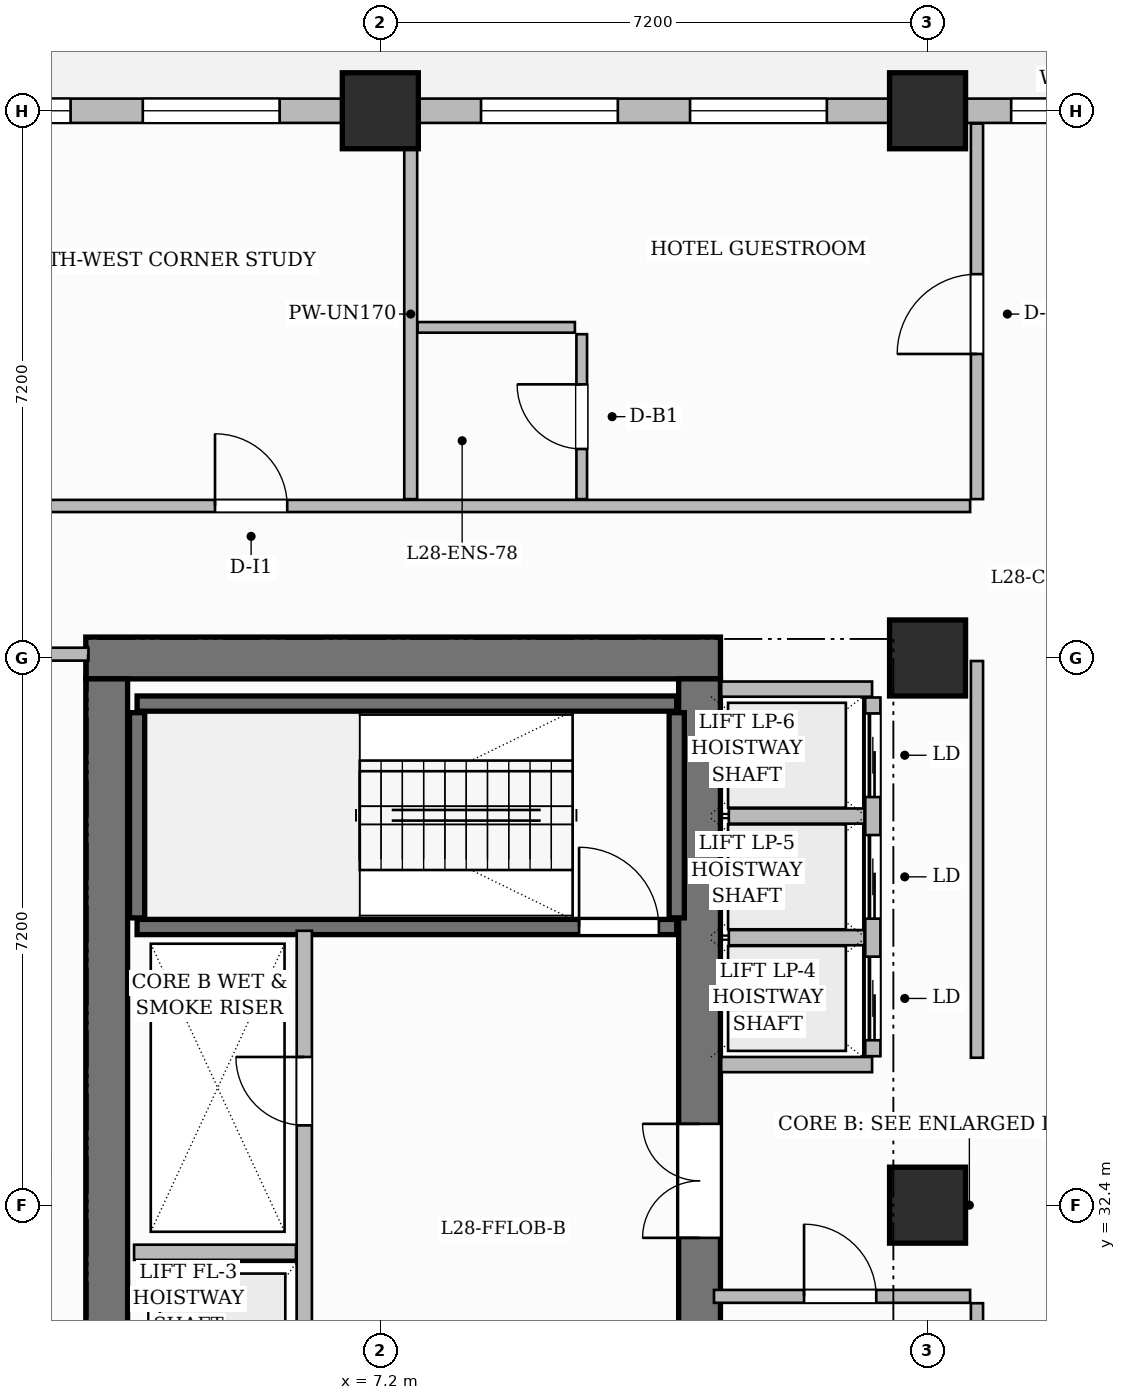
"""IFC4 building model, lengths in metres.
Left out: names, types, materials, properties, quantities, classifications, styles, units other than length and angle.
Written with IfcOpenShell. Run it as: python <this file> out.ifc"""

import sys

from ifc_helpers import new_model, si_unit, direction, frame, frame_2d, origin, origin_2d, place, context, subcontext, project, spatial, rectangle, extrude, source, transform, mapped, element, fill, save


model = new_model("IFC4")
c1 = context("Model", 3, precision=1e-05, world=origin(), true_north=direction((0.0, 1.0)))
c2 = subcontext(c1, "Body", "Model", "MODEL_VIEW")
j1 = project(units=[si_unit("LENGTHUNIT", "METRE"), si_unit("PLANEANGLEUNIT", "RADIAN")], contexts=[c1])
p1 = place(None, origin())
s1 = spatial("IfcSite", under=j1, at=p1, CompositionType="ELEMENT")
p2 = place(p1, origin())
s2 = spatial("IfcBuilding", under=s1, at=p2, CompositionType="ELEMENT")
p3 = place(p2, frame((0.0, 0.0, 115.5)))
s3 = spatial("IfcBuildingStorey", under=s2, at=p3, CompositionType="ELEMENT", Elevation=115.5)
p4 = place(p3, frame((3.325, 39.6, 0.0), z_axis=(0.0, 0.0, 1.0), x_axis=(1.0, 0.0, 0.0)))
e1 = element("IfcWall", 1, at=p4, inside=s3, PredefinedType="SHEAR", context=c2, shape_type="SweptSolid", body=[
    extrude(rectangle(XDim=8.35, YDim=0.55, at=frame_2d((4.175, 0.0))), origin(), (0.0, 0.0, 1.0), 3.7),
])
p5 = place(p3, frame((3.6, 25.475, 0.0), z_axis=(0.0, 0.0, 1.0), x_axis=(0.0, 1.0, 0.0)))
e2 = element("IfcWall", 2, at=p5, inside=s3, PredefinedType="SHEAR", context=c2, shape_type="SweptSolid", body=[
    extrude(rectangle(XDim=13.85, YDim=0.55, at=frame_2d((6.925, 0.0))), origin(), (0.0, 0.0, 1.0), 3.7),
])
p6 = place(p3, frame((11.4, 25.475, 0.0), z_axis=(0.0, 0.0, 1.0), x_axis=(0.0, 1.0, 0.0)))
e3 = element("IfcWall", 3, at=p6, inside=s3, PredefinedType="SHEAR", context=c2, shape_type="SweptSolid", body=[
    extrude(rectangle(XDim=13.85, YDim=0.55, at=frame_2d((6.925, 0.0))), origin(), (0.0, 0.0, 1.0), 3.7),
])
p7 = place(p6, frame((6.495, 0.0, 0.0)))
e4 = element("IfcOpeningElement", 4, at=p7, cuts=e3, PredefinedType="OPENING", context=c2, shape_type="SweptSolid", body=[
    extrude(rectangle(XDim=1.5, YDim=2.2, at=frame_2d((0.75, 1.1))), frame((0.0, 0.285, 0.0), z_axis=(0.0, -1.0, 0.0), x_axis=(1.0, 0.0, 0.0)), (0.0, 0.0, 1.0), 0.57),
])
m1 = source(origin(), c2, "Body", "SweptSolid", [
    extrude(rectangle(XDim=1.0, YDim=1.0, at=origin_2d()), origin(), (0.0, 0.0, 1.0), 3.7),
])
for number, where, z_axis, x_axis in (
    (5, (7.2, 46.8, 0.0), (0.0, 0.0, 1.0), (1.0, 0.0, 0.0)),
    (6, (14.4, 32.4, 0.0), (0.0, 0.0, 1.0), (1.0, 0.0, 0.0)),
    (7, (14.4, 39.6, 0.0), (0.0, 0.0, 1.0), (1.0, 0.0, 0.0)),
    (8, (14.4, 46.8, 0.0), (0.0, 0.0, 1.0), (1.0, 0.0, 0.0)),
):
    element("IfcColumn", number, at=place(p3, frame(where, z_axis=z_axis, x_axis=x_axis)), inside=s3, PredefinedType="COLUMN", context=c2, shape_type="MappedRepresentation", body=[
        mapped(m1, transform((0.0, 0.0, 0.0), scale=1.0)),
    ])
p8 = place(p3, frame((4.0, 39.0, 0.0), z_axis=(0.0, 0.0, 1.0), x_axis=(1.0, 0.0, 0.0)))
e9 = element("IfcWall", 9, at=p8, inside=s3, PredefinedType="SHEAR", context=c2, shape_type="SweptSolid", body=[
    extrude(rectangle(XDim=7.1, YDim=0.2, at=frame_2d((3.55, 0.0))), origin(), (0.0, 0.0, 1.0), 3.7),
])
for number, where, z_axis, x_axis in (
    (10, (4.0, 36.18, 0.0), (0.0, 0.0, 1.0), (0.0, 1.0, 0.0)),
    (11, (11.1, 36.18, 0.0), (0.0, 0.0, 1.0), (0.0, 1.0, 0.0)),
):
    element("IfcWall", number, at=place(p3, frame(where, z_axis=z_axis, x_axis=x_axis)), inside=s3, PredefinedType="SHEAR", context=c2, shape_type="SweptSolid", body=[
        extrude(rectangle(XDim=2.7, YDim=0.2, at=frame_2d((1.35, 0.0))), origin(), (0.0, 0.0, 1.0), 3.7),
    ])
p9 = place(p3, frame((4.0, 36.06, 0.0), z_axis=(0.0, 0.0, 1.0), x_axis=(1.0, 0.0, 0.0)))
e12 = element("IfcWall", 12, at=p9, inside=s3, PredefinedType="SHEAR", context=c2, shape_type="SweptSolid", body=[
    extrude(rectangle(XDim=7.1, YDim=0.2, at=frame_2d((3.55, 0.0))), origin(), (0.0, 0.0, 1.0), 3.7),
])
p10 = place(p9, frame((5.815, 0.0, 0.0)))
e13 = element("IfcOpeningElement", 13, at=p10, cuts=e12, PredefinedType="OPENING", context=c2, shape_type="SweptSolid", body=[
    extrude(rectangle(XDim=1.05, YDim=2.2, at=frame_2d((0.525, 1.1))), frame((0.0, 0.11, 0.0), z_axis=(0.0, -1.0, 0.0), x_axis=(1.0, 0.0, 0.0)), (0.0, 0.0, 1.0), 0.22),
])
p11 = place(p3, frame((6.2, 28.79, 0.0), z_axis=(0.0, 0.0, 1.0), x_axis=(0.0, 1.0, 0.0)))
e14 = element("IfcWall", 14, at=p11, inside=s3, PredefinedType="PARTITIONING", context=c2, shape_type="SweptSolid", body=[
    extrude(rectangle(XDim=7.22, YDim=0.2, at=frame_2d((3.61, 0.0))), origin(), (0.0, 0.0, 1.0), 3.45),
])
p12 = place(p11, frame((4.66, 0.0, 0.0)))
e15 = element("IfcOpeningElement", 15, at=p12, cuts=e14, PredefinedType="OPENING", context=c2, shape_type="SweptSolid", body=[
    extrude(rectangle(XDim=0.9, YDim=2.1, at=frame_2d((0.45, 1.05))), frame((0.0, 0.11, 0.0), z_axis=(0.0, -1.0, 0.0), x_axis=(1.0, 0.0, 0.0)), (0.0, 0.0, 1.0), 0.22),
])
p13 = place(p11, frame((0.96, 0.0, 0.0)))
e16 = element("IfcOpeningElement", 16, at=p13, cuts=e14, PredefinedType="OPENING", context=c2, shape_type="SweptSolid", body=[
    extrude(rectangle(XDim=1.1, YDim=2.2, at=frame_2d((0.55, 1.1))), frame((0.0, 0.11, 0.0), z_axis=(0.0, -1.0, 0.0), x_axis=(1.0, 0.0, 0.0)), (0.0, 0.0, 1.0), 0.22),
])
p14 = place(p3, frame((3.96, 31.78, 0.0), z_axis=(0.0, 0.0, 1.0), x_axis=(1.0, 0.0, 0.0)))
e17 = element("IfcWall", 17, at=p14, inside=s3, PredefinedType="PARTITIONING", context=c2, shape_type="SweptSolid", body=[
    extrude(rectangle(XDim=2.13, YDim=0.2, at=frame_2d((1.065, 0.0))), origin(), (0.0, 0.0, 1.0), 3.45),
])
for number, where, z_axis, x_axis in (
    (18, (11.685, 34.25, 0.0), (0.0, 0.0, 1.0), (1.0, 0.0, 0.0)),
    (19, (11.685, 39.19, 0.0), (0.0, 0.0, 1.0), (1.0, 0.0, 0.0)),
):
    element("IfcWall", number, at=place(p3, frame(where, z_axis=z_axis, x_axis=x_axis)), inside=s3, PredefinedType="PARTITIONING", context=c2, shape_type="SweptSolid", body=[
        extrude(rectangle(XDim=1.985, YDim=0.2, at=frame_2d((0.992, 0.0))), origin(), (0.0, 0.0, 1.0), 3.45),
    ])
p15 = place(p3, frame((13.68, 34.36, 0.0), z_axis=(0.0, 0.0, 1.0), x_axis=(0.0, 1.0, 0.0)))
e20 = element("IfcWall", 20, at=p15, inside=s3, PredefinedType="PARTITIONING", context=c2, shape_type="SweptSolid", body=[
    extrude(rectangle(XDim=4.72, YDim=0.2, at=frame_2d((2.36, 0.0))), origin(), (0.0, 0.0, 1.0), 3.45),
])
p16 = place(p15, frame((0.21, 0.0, 0.0)))
e21 = element("IfcOpeningElement", 21, at=p16, cuts=e20, PredefinedType="OPENING", context=c2, shape_type="SweptSolid", body=[
    extrude(rectangle(XDim=1.1, YDim=2.2, at=frame_2d((0.55, 1.1))), frame((0.0, 0.11, 0.0), z_axis=(0.0, -1.0, 0.0), x_axis=(1.0, 0.0, 0.0)), (0.0, 0.0, 1.0), 0.22),
])
p17 = place(p15, frame((1.81, 0.0, 0.0)))
e22 = element("IfcOpeningElement", 22, at=p17, cuts=e20, PredefinedType="OPENING", context=c2, shape_type="SweptSolid", body=[
    extrude(rectangle(XDim=1.1, YDim=2.2, at=frame_2d((0.55, 1.1))), frame((0.0, 0.11, 0.0), z_axis=(0.0, -1.0, 0.0), x_axis=(1.0, 0.0, 0.0)), (0.0, 0.0, 1.0), 0.22),
])
p18 = place(p15, frame((3.41, 0.0, 0.0)))
e23 = element("IfcOpeningElement", 23, at=p18, cuts=e20, PredefinedType="OPENING", context=c2, shape_type="SweptSolid", body=[
    extrude(rectangle(XDim=1.1, YDim=2.2, at=frame_2d((0.55, 1.1))), frame((0.0, 0.11, 0.0), z_axis=(0.0, -1.0, 0.0), x_axis=(1.0, 0.0, 0.0)), (0.0, 0.0, 1.0), 0.22),
])
for number, where, z_axis, x_axis in (
    (24, (11.785, 35.92, 0.0), (0.0, 0.0, 1.0), (1.0, 0.0, 0.0)),
    (25, (11.785, 37.52, 0.0), (0.0, 0.0, 1.0), (1.0, 0.0, 0.0)),
):
    element("IfcWall", number, at=place(p3, frame(where, z_axis=z_axis, x_axis=x_axis)), inside=s3, PredefinedType="PARTITIONING", context=c2, shape_type="SweptSolid", body=[
        extrude(rectangle(XDim=1.785, YDim=0.2, at=frame_2d((0.893, 0.0))), origin(), (0.0, 0.0, 1.0), 3.45),
    ])
p19 = place(p3, frame((0.24, 39.65, 0.0), z_axis=(0.0, 0.0, 1.0), x_axis=(1.0, 0.0, 0.0)))
e26 = element("IfcWall", 26, at=p19, inside=s3, PredefinedType="PARTITIONING", context=c2, shape_type="SweptSolid", body=[
    extrude(rectangle(XDim=3.12, YDim=0.17, at=frame_2d((1.56, 0.0))), origin(), (0.0, 0.0, 1.0), 3.45),
])
p20 = place(p19, frame((1.11, 0.0, 0.0)))
e27 = element("IfcOpeningElement", 27, at=p20, cuts=e26, PredefinedType="OPENING", context=c2, shape_type="SweptSolid", body=[
    extrude(rectangle(XDim=0.9, YDim=2.15, at=frame_2d((0.45, 1.075))), frame((0.0, 0.095, 0.0), z_axis=(0.0, -1.0, 0.0), x_axis=(1.0, 0.0, 0.0)), (0.0, 0.0, 1.0), 0.19),
])
p21 = place(p3, frame((15.05, 34.34, 0.0), z_axis=(0.0, 0.0, 1.0), x_axis=(0.0, 1.0, 0.0)))
e28 = element("IfcWall", 28, at=p21, inside=s3, PredefinedType="PARTITIONING", context=c2, shape_type="SweptSolid", body=[
    extrude(rectangle(XDim=5.22, YDim=0.16, at=frame_2d((2.61, 0.0))), origin(), (0.0, 0.0, 1.0), 3.45),
])
p22 = place(p3, frame((15.05, 41.69, 0.0), z_axis=(0.0, 0.0, 1.0), x_axis=(0.0, 1.0, 0.0)))
e29 = element("IfcWall", 29, at=p22, inside=s3, PredefinedType="PARTITIONING", context=c2, shape_type="SweptSolid", body=[
    extrude(rectangle(XDim=4.942, YDim=0.16, at=frame_2d((2.471, 0.0))), origin(), (0.0, 0.0, 1.0), 3.45),
])
p23 = place(p22, frame((1.91, 0.0, 0.0)))
e30 = element("IfcOpeningElement", 30, at=p23, cuts=e29, PredefinedType="OPENING", context=c2, shape_type="SweptSolid", body=[
    extrude(rectangle(XDim=1.05, YDim=2.25, at=frame_2d((0.525, 1.125))), frame((0.0, 0.09, 0.0), z_axis=(0.0, -1.0, 0.0), x_axis=(1.0, 0.0, 0.0)), (0.0, 0.0, 1.0), 0.18),
])
p24 = place(p3, frame((7.6, 41.69, 0.0), z_axis=(0.0, 0.0, 1.0), x_axis=(0.0, 1.0, 0.0)))
e31 = element("IfcWall", 31, at=p24, inside=s3, PredefinedType="PARTITIONING", context=c2, shape_type="SweptSolid", body=[
    extrude(rectangle(XDim=4.87, YDim=0.17, at=frame_2d((2.435, 0.0))), origin(), (0.0, 0.0, 1.0), 3.45),
])
p25 = place(p3, frame((0.168, 41.6, 0.0), z_axis=(0.0, 0.0, 1.0), x_axis=(1.0, 0.0, 0.0)))
e32 = element("IfcWall", 32, at=p25, inside=s3, PredefinedType="PARTITIONING", context=c2, shape_type="SweptSolid", body=[
    extrude(rectangle(XDim=14.792, YDim=0.16, at=frame_2d((7.396, 0.0))), origin(), (0.0, 0.0, 1.0), 2.935),
])
p26 = place(p25, frame((4.857, 0.0, 0.0)))
e33 = element("IfcOpeningElement", 33, at=p26, cuts=e32, PredefinedType="OPENING", context=c2, shape_type="SweptSolid", body=[
    extrude(rectangle(XDim=0.95, YDim=2.15, at=frame_2d((0.475, 1.075))), frame((0.0, 0.09, 0.0), z_axis=(0.0, -1.0, 0.0), x_axis=(1.0, 0.0, 0.0)), (0.0, 0.0, 1.0), 0.18),
])
p27 = place(p3, frame((7.69, 43.95, 0.0), z_axis=(0.0, 0.0, 1.0), x_axis=(1.0, 0.0, 0.0)))
e34 = element("IfcWall", 34, at=p27, inside=s3, PredefinedType="PARTITIONING", context=c2, shape_type="SweptSolid", body=[
    extrude(rectangle(XDim=2.07, YDim=0.14, at=frame_2d((1.035, 0.0))), origin(), (0.0, 0.0, 1.0), 2.935),
])
p28 = place(p3, frame((9.85, 41.69, 0.0), z_axis=(0.0, 0.0, 1.0), x_axis=(0.0, 1.0, 0.0)))
e35 = element("IfcWall", 35, at=p28, inside=s3, PredefinedType="PARTITIONING", context=c2, shape_type="SweptSolid", body=[
    extrude(rectangle(XDim=2.17, YDim=0.14, at=frame_2d((1.085, 0.0))), origin(), (0.0, 0.0, 1.0), 3.45),
])
p29 = place(p28, frame((0.66, 0.0, 0.0)))
e36 = element("IfcOpeningElement", 36, at=p29, cuts=e35, PredefinedType="OPENING", context=c2, shape_type="SweptSolid", body=[
    extrude(rectangle(XDim=0.85, YDim=2.1, at=frame_2d((0.425, 1.05))), frame((0.0, 0.08, 0.0), z_axis=(0.0, -1.0, 0.0), x_axis=(1.0, 0.0, 0.0)), (0.0, 0.0, 1.0), 0.16),
])
p30 = place(p3, frame((15.05, 25.39, 0.0), z_axis=(0.0, 0.0, 1.0), x_axis=(0.0, 1.0, 0.0)))
e37 = element("IfcWall", 37, at=p30, inside=s3, PredefinedType="PARTITIONING", context=c2, shape_type="SweptSolid", body=[
    extrude(rectangle(XDim=5.72, YDim=0.16, at=frame_2d((2.86, 0.0))), origin(), (0.0, 0.0, 1.0), 3.45),
])
p31 = place(p3, frame((11.59, 31.2, 0.0), z_axis=(0.0, 0.0, 1.0), x_axis=(1.0, 0.0, 0.0)))
e38 = element("IfcWall", 38, at=p31, inside=s3, PredefinedType="PARTITIONING", context=c2, shape_type="SweptSolid", body=[
    extrude(rectangle(XDim=3.37, YDim=0.17, at=frame_2d((1.685, 0.0))), origin(), (0.0, 0.0, 1.0), 3.45),
])
p32 = place(p31, frame((1.185, 0.0, 0.0)))
e39 = element("IfcOpeningElement", 39, at=p32, cuts=e38, PredefinedType="OPENING", context=c2, shape_type="SweptSolid", body=[
    extrude(rectangle(XDim=0.95, YDim=2.15, at=frame_2d((0.475, 1.075))), frame((0.0, 0.095, 0.0), z_axis=(0.0, -1.0, 0.0), x_axis=(1.0, 0.0, 0.0)), (0.0, 0.0, 1.0), 0.19),
])
p33 = place(p3, frame((0.0, 46.8, 0.0), z_axis=(0.0, 0.0, 1.0), x_axis=(1.0, 0.0, 0.0)))
e40 = element("IfcWall", 40, at=p33, inside=s3, PredefinedType="SOLIDWALL", context=c2, shape_type="SweptSolid", body=[
    extrude(rectangle(XDim=18.0, YDim=0.32, at=frame_2d((9.0, 0.0))), origin(), (0.0, 0.0, 1.0), 2.935),
])
p34 = place(p33, frame((1.325, 0.0, 0.8)))
e41 = element("IfcOpeningElement", 41, at=p34, cuts=e40, PredefinedType="OPENING", context=c2, shape_type="SweptSolid", body=[
    extrude(rectangle(XDim=1.8, YDim=1.85, at=frame_2d((0.9, 0.925))), frame((0.0, 0.17, 0.0), z_axis=(0.0, -1.0, 0.0), x_axis=(1.0, 0.0, 0.0)), (0.0, 0.0, 1.0), 0.34),
])
p35 = place(p33, frame((4.075, 0.0, 0.8)))
e42 = element("IfcOpeningElement", 42, at=p35, cuts=e40, PredefinedType="OPENING", context=c2, shape_type="SweptSolid", body=[
    extrude(rectangle(XDim=1.8, YDim=1.85, at=frame_2d((0.9, 0.925))), frame((0.0, 0.17, 0.0), z_axis=(0.0, -1.0, 0.0), x_axis=(1.0, 0.0, 0.0)), (0.0, 0.0, 1.0), 0.34),
])
p36 = place(p33, frame((8.525, 0.0, 0.8)))
e43 = element("IfcOpeningElement", 43, at=p36, cuts=e40, PredefinedType="OPENING", context=c2, shape_type="SweptSolid", body=[
    extrude(rectangle(XDim=1.8, YDim=1.85, at=frame_2d((0.9, 0.925))), frame((0.0, 0.17, 0.0), z_axis=(0.0, -1.0, 0.0), x_axis=(1.0, 0.0, 0.0)), (0.0, 0.0, 1.0), 0.34),
])
p37 = place(p33, frame((11.275, 0.0, 0.8)))
e44 = element("IfcOpeningElement", 44, at=p37, cuts=e40, PredefinedType="OPENING", context=c2, shape_type="SweptSolid", body=[
    extrude(rectangle(XDim=1.8, YDim=1.85, at=frame_2d((0.9, 0.925))), frame((0.0, 0.17, 0.0), z_axis=(0.0, -1.0, 0.0), x_axis=(1.0, 0.0, 0.0)), (0.0, 0.0, 1.0), 0.34),
])
p38 = place(p33, frame((15.5, 0.0, 0.8)))
e45 = element("IfcOpeningElement", 45, at=p38, cuts=e40, PredefinedType="OPENING", context=c2, shape_type="SweptSolid", body=[
    extrude(rectangle(XDim=1.4, YDim=1.85, at=frame_2d((0.7, 0.925))), frame((0.0, 0.17, 0.0), z_axis=(0.0, -1.0, 0.0), x_axis=(1.0, 0.0, 0.0)), (0.0, 0.0, 1.0), 0.34),
])
m2 = source(origin(), c2, "Body", "SweptSolid", [
    extrude(rectangle(XDim=1.05, YDim=2.2, at=frame_2d((0.525, 1.1))), frame((0.0, 0.025, 0.0), z_axis=(0.0, -1.0, 0.0), x_axis=(1.0, 0.0, 0.0)), (0.0, 0.0, 1.0), 0.05),
])
p39 = place(p10, origin())
e46 = element("IfcDoor", 46, at=p39, inside=s3, OperationType="SINGLE_SWING_LEFT", PredefinedType="DOOR", context=c2, shape_type="MappedRepresentation", body=[
    mapped(m2, transform((0.0, 0.0, 0.0), scale=1.0)),
])
fill(e13, e46)
m3 = source(origin(), c2, "Body", "SweptSolid", [
    extrude(rectangle(XDim=0.9, YDim=2.1, at=frame_2d((0.45, 1.05))), frame((0.0, 0.025, 0.0), z_axis=(0.0, -1.0, 0.0), x_axis=(1.0, 0.0, 0.0)), (0.0, 0.0, 1.0), 0.05),
])
p40 = place(p12, origin())
e47 = element("IfcDoor", 47, at=p40, inside=s3, OperationType="SINGLE_SWING_RIGHT", PredefinedType="DOOR", context=c2, shape_type="MappedRepresentation", body=[
    mapped(m3, transform((0.0, 0.0, 0.0), scale=1.0)),
])
fill(e15, e47)
m4 = source(origin(), c2, "Body", "SweptSolid", [
    extrude(rectangle(XDim=1.5, YDim=2.2, at=frame_2d((0.75, 1.1))), frame((0.0, 0.025, 0.0), z_axis=(0.0, -1.0, 0.0), x_axis=(1.0, 0.0, 0.0)), (0.0, 0.0, 1.0), 0.05),
])
p41 = place(p7, origin())
e48 = element("IfcDoor", 48, at=p41, inside=s3, OperationType="DOUBLE_DOOR_SINGLE_SWING", PredefinedType="DOOR", context=c2, shape_type="MappedRepresentation", body=[
    mapped(m4, transform((0.0, 0.0, 0.0), scale=1.0)),
])
fill(e4, e48)
m5 = source(origin(), c2, "Body", "SweptSolid", [
    extrude(rectangle(XDim=0.95, YDim=2.15, at=frame_2d((0.475, 1.075))), frame((0.0, 0.025, 0.0), z_axis=(0.0, -1.0, 0.0), x_axis=(1.0, 0.0, 0.0)), (0.0, 0.0, 1.0), 0.05),
])
p42 = place(p26, origin())
e49 = element("IfcDoor", 49, at=p42, inside=s3, OperationType="SINGLE_SWING_LEFT", PredefinedType="DOOR", context=c2, shape_type="MappedRepresentation", body=[
    mapped(m5, transform((0.0, 0.0, 0.0), scale=1.0)),
])
fill(e33, e49)
m6 = source(origin(), c2, "Body", "SweptSolid", [
    extrude(rectangle(XDim=0.85, YDim=2.1, at=frame_2d((0.425, 1.05))), frame((0.0, 0.025, 0.0), z_axis=(0.0, -1.0, 0.0), x_axis=(1.0, 0.0, 0.0)), (0.0, 0.0, 1.0), 0.05),
])
p43 = place(p29, origin())
e50 = element("IfcDoor", 50, at=p43, inside=s3, OperationType="SINGLE_SWING_RIGHT", PredefinedType="DOOR", context=c2, shape_type="MappedRepresentation", body=[
    mapped(m6, transform((0.0, 0.0, 0.0), scale=1.0)),
])
fill(e36, e50)
m7 = source(origin(), c2, "Body", "SweptSolid", [
    extrude(rectangle(XDim=1.05, YDim=2.25, at=frame_2d((0.525, 1.125))), frame((0.0, 0.025, 0.0), z_axis=(0.0, -1.0, 0.0), x_axis=(1.0, 0.0, 0.0)), (0.0, 0.0, 1.0), 0.05),
])
p44 = place(p23, origin())
e51 = element("IfcDoor", 51, at=p44, inside=s3, OperationType="SINGLE_SWING_LEFT", PredefinedType="DOOR", context=c2, shape_type="MappedRepresentation", body=[
    mapped(m7, transform((0.0, 0.0, 0.0), scale=1.0)),
])
fill(e30, e51)
p45 = place(p32, origin())
e52 = element("IfcDoor", 52, at=p45, inside=s3, OperationType="SINGLE_SWING_LEFT", PredefinedType="DOOR", context=c2, shape_type="MappedRepresentation", body=[
    mapped(m5, transform((0.0, 0.0, 0.0), scale=1.0)),
])
fill(e39, e52)
m8 = source(origin(), c2, "Body", "SweptSolid", [
    extrude(rectangle(XDim=1.1, YDim=2.2, at=frame_2d((0.55, 1.1))), frame((0.0, 0.025, 0.0), z_axis=(0.0, -1.0, 0.0), x_axis=(1.0, 0.0, 0.0)), (0.0, 0.0, 1.0), 0.05),
])
p46 = place(p16, origin())
e53 = element("IfcDoor", 53, at=p46, inside=s3, OperationType="SLIDING_TO_LEFT", PredefinedType="DOOR", context=c2, shape_type="MappedRepresentation", body=[
    mapped(m8, transform((0.0, 0.0, 0.0), scale=1.0)),
])
fill(e21, e53)
p47 = place(p17, origin())
e54 = element("IfcDoor", 54, at=p47, inside=s3, OperationType="SLIDING_TO_LEFT", PredefinedType="DOOR", context=c2, shape_type="MappedRepresentation", body=[
    mapped(m8, transform((0.0, 0.0, 0.0), scale=1.0)),
])
fill(e22, e54)
p48 = place(p18, origin())
e55 = element("IfcDoor", 55, at=p48, inside=s3, OperationType="SLIDING_TO_LEFT", PredefinedType="DOOR", context=c2, shape_type="MappedRepresentation", body=[
    mapped(m8, transform((0.0, 0.0, 0.0), scale=1.0)),
])
fill(e23, e55)
m9 = source(origin(), c2, "Body", "SweptSolid", [
    extrude(rectangle(XDim=1.8, YDim=1.85, at=frame_2d((0.9, 0.925))), frame((0.0, 0.03, 0.0), z_axis=(0.0, -1.0, 0.0), x_axis=(1.0, 0.0, 0.0)), (0.0, 0.0, 1.0), 0.06),
])
p49 = place(p34, origin())
e56 = element("IfcWindow", 56, at=p49, inside=s3, PartitioningType="DOUBLE_PANEL_VERTICAL", PredefinedType="WINDOW", context=c2, shape_type="MappedRepresentation", body=[
    mapped(m9, transform((0.0, 0.0, 0.0), scale=1.0)),
])
fill(e41, e56)
p50 = place(p35, origin())
e57 = element("IfcWindow", 57, at=p50, inside=s3, PartitioningType="DOUBLE_PANEL_VERTICAL", PredefinedType="WINDOW", context=c2, shape_type="MappedRepresentation", body=[
    mapped(m9, transform((0.0, 0.0, 0.0), scale=1.0)),
])
fill(e42, e57)
p51 = place(p36, origin())
e58 = element("IfcWindow", 58, at=p51, inside=s3, PartitioningType="DOUBLE_PANEL_VERTICAL", PredefinedType="WINDOW", context=c2, shape_type="MappedRepresentation", body=[
    mapped(m9, transform((0.0, 0.0, 0.0), scale=1.0)),
])
fill(e43, e58)
p52 = place(p37, origin())
e59 = element("IfcWindow", 59, at=p52, inside=s3, PartitioningType="DOUBLE_PANEL_VERTICAL", PredefinedType="WINDOW", context=c2, shape_type="MappedRepresentation", body=[
    mapped(m9, transform((0.0, 0.0, 0.0), scale=1.0)),
])
fill(e44, e59)
m10 = source(origin(), c2, "Body", "SweptSolid", [
    extrude(rectangle(XDim=1.4, YDim=1.85, at=frame_2d((0.7, 0.925))), frame((0.0, 0.03, 0.0), z_axis=(0.0, -1.0, 0.0), x_axis=(1.0, 0.0, 0.0)), (0.0, 0.0, 1.0), 0.06),
])
p53 = place(p38, origin())
e60 = element("IfcWindow", 60, at=p53, inside=s3, PartitioningType="SINGLE_PANEL", PredefinedType="WINDOW", context=c2, shape_type="MappedRepresentation", body=[
    mapped(m10, transform((0.0, 0.0, 0.0), scale=1.0)),
])
fill(e45, e60)
save(model, sys.argv[1])
